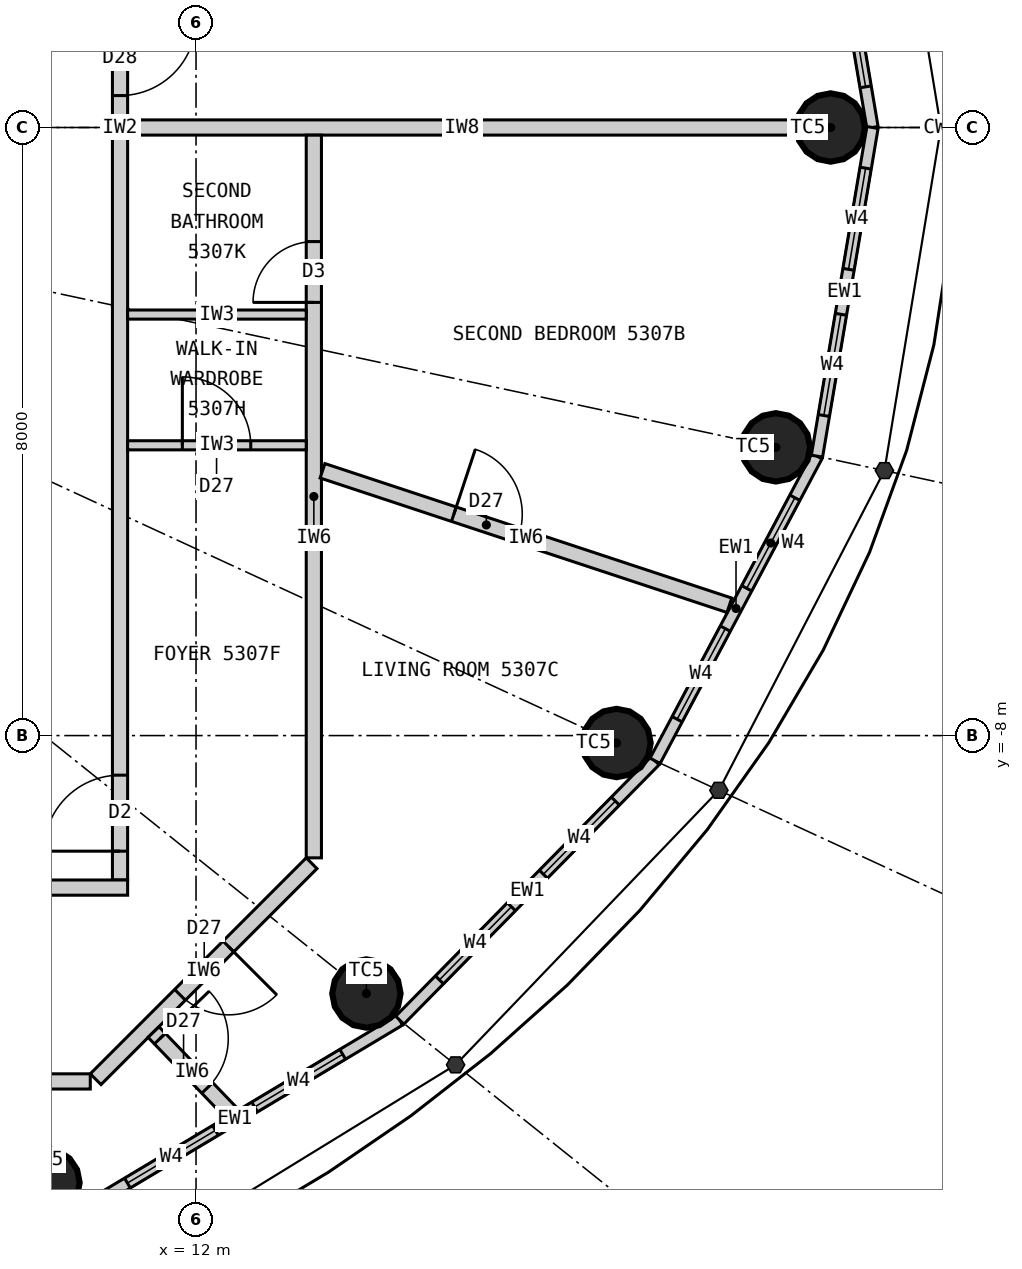
"""IFC4 building model, lengths in metres.
Left out: names, types, materials, properties, quantities, classifications, styles, units other than length and angle.
Written with IfcOpenShell. Run it as: python <this file> out.ifc"""

import sys

from ifc_helpers import new_model, si_unit, direction, frame, frame_2d, origin, origin_2d, place, context, subcontext, project, spatial, rectangle, circle, extrude, element, fill, save


model = new_model("IFC4")
c1 = context("Model", 3, precision=1e-05, world=origin(), true_north=direction((0.0, 1.0)))
c2 = subcontext(c1, "Body", "Model", "MODEL_VIEW")
j1 = project(units=[si_unit("LENGTHUNIT", "METRE"), si_unit("PLANEANGLEUNIT", "RADIAN")], contexts=[c1])
p1 = place(None, origin())
s1 = spatial("IfcSite", under=j1, at=p1, CompositionType="ELEMENT")
p2 = place(p1, origin())
s2 = spatial("IfcBuilding", under=s1, at=p2, CompositionType="ELEMENT")
p3 = place(p2, frame((0.0, 0.0, 199.5)))
s3 = spatial("IfcBuildingStorey", under=s2, at=p3, CompositionType="ELEMENT", Elevation=199.5)
for number, where, z_axis, x_axis in (
    (1, (20.35, 0.0, 0.0), (0.0, 0.0, 1.0), (1.0, 0.0, 0.0)),
    (2, (10.019, -13.883, 0.0), (0.0, 0.0, 1.0), (1.0, 0.0, 0.0)),
    (3, (14.241, -11.393, 0.0), (0.0, 0.0, 1.0), (1.0, 0.0, 0.0)),
    (4, (17.532, -8.098, 0.0), (0.0, 0.0, 1.0), (1.0, 0.0, 0.0)),
    (5, (19.629, -4.208, 0.0), (0.0, 0.0, 1.0), (1.0, 0.0, 0.0)),
):
    element("IfcColumn", number, at=place(p3, frame(where, z_axis=z_axis, x_axis=x_axis)), inside=s3, PredefinedType="COLUMN", context=c2, shape_type="SweptSolid", body=[
        extrude(circle(Radius=0.45, at=origin_2d()), origin(), (0.0, 0.0, 1.0), 3.3),
    ])
p4 = place(p3, frame((20.9, 0.0, 0.0), z_axis=(0.0, 0.0, 1.0), x_axis=(-0.166538513568, 0.986034950445, 0.0)))
e6 = element("IfcWall", 6, at=p4, inside=s3, PredefinedType="ELEMENTEDWALL", context=c2, shape_type="SweptSolid", body=[
    extrude(rectangle(XDim=4.385, YDim=0.15, at=frame_2d((2.192, 0.0))), origin(), (0.0, 0.0, 1.0), 3.12),
])
p5 = place(p4, frame((0.542, 0.0, 0.9)))
e7 = element("IfcOpeningElement", 7, at=p5, cuts=e6, PredefinedType="OPENING", context=c2, shape_type="SweptSolid", body=[
    extrude(rectangle(XDim=1.35, YDim=1.9, at=frame_2d((0.675, 0.95))), frame((0.0, 0.085, 0.0), z_axis=(0.0, -1.0, 0.0), x_axis=(1.0, 0.0, 0.0)), (0.0, 0.0, 1.0), 0.17),
])
p6 = place(p4, frame((2.492, 0.0, 0.9)))
e8 = element("IfcOpeningElement", 8, at=p6, cuts=e6, PredefinedType="OPENING", context=c2, shape_type="SweptSolid", body=[
    extrude(rectangle(XDim=1.35, YDim=1.9, at=frame_2d((0.675, 0.95))), frame((0.0, 0.085, 0.0), z_axis=(0.0, -1.0, 0.0), x_axis=(1.0, 0.0, 0.0)), (0.0, 0.0, 1.0), 0.17),
])
p7 = place(p3, frame((10.346, -14.336, 0.0), z_axis=(0.0, 0.0, 1.0), x_axis=(0.85822150553, 0.513279502265, 0.0)))
e9 = element("IfcWall", 9, at=p7, inside=s3, PredefinedType="ELEMENTEDWALL", context=c2, shape_type="SweptSolid", body=[
    extrude(rectangle(XDim=5.05, YDim=0.15, at=frame_2d((2.525, 0.0))), origin(), (0.0, 0.0, 1.0), 3.12),
])
p8 = place(p7, frame((0.875, 0.0, 0.9)))
e10 = element("IfcOpeningElement", 10, at=p8, cuts=e9, PredefinedType="OPENING", context=c2, shape_type="SweptSolid", body=[
    extrude(rectangle(XDim=1.35, YDim=1.9, at=frame_2d((0.675, 0.95))), frame((0.0, 0.085, 0.0), z_axis=(0.0, -1.0, 0.0), x_axis=(1.0, 0.0, 0.0)), (0.0, 0.0, 1.0), 0.17),
])
p9 = place(p7, frame((2.825, 0.0, 0.9)))
e11 = element("IfcOpeningElement", 11, at=p9, cuts=e9, PredefinedType="OPENING", context=c2, shape_type="SweptSolid", body=[
    extrude(rectangle(XDim=1.35, YDim=1.9, at=frame_2d((0.675, 0.95))), frame((0.0, 0.085, 0.0), z_axis=(0.0, -1.0, 0.0), x_axis=(1.0, 0.0, 0.0)), (0.0, 0.0, 1.0), 0.17),
])
p10 = place(p3, frame((14.68, -11.744, 0.0), z_axis=(0.0, 0.0, 1.0), x_axis=(0.701527379618, 0.712642501993, 0.0)))
e12 = element("IfcWall", 12, at=p10, inside=s3, PredefinedType="ELEMENTEDWALL", context=c2, shape_type="SweptSolid", body=[
    extrude(rectangle(XDim=4.788, YDim=0.15, at=frame_2d((2.394, 0.0))), origin(), (0.0, 0.0, 1.0), 3.12),
])
p11 = place(p10, frame((0.744, 0.0, 0.9)))
e13 = element("IfcOpeningElement", 13, at=p11, cuts=e12, PredefinedType="OPENING", context=c2, shape_type="SweptSolid", body=[
    extrude(rectangle(XDim=1.35, YDim=1.9, at=frame_2d((0.675, 0.95))), frame((0.0, 0.085, 0.0), z_axis=(0.0, -1.0, 0.0), x_axis=(1.0, 0.0, 0.0)), (0.0, 0.0, 1.0), 0.17),
])
p12 = place(p10, frame((2.694, 0.0, 0.9)))
e14 = element("IfcOpeningElement", 14, at=p12, cuts=e12, PredefinedType="OPENING", context=c2, shape_type="SweptSolid", body=[
    extrude(rectangle(XDim=1.35, YDim=1.9, at=frame_2d((0.675, 0.95))), frame((0.0, 0.085, 0.0), z_axis=(0.0, -1.0, 0.0), x_axis=(1.0, 0.0, 0.0)), (0.0, 0.0, 1.0), 0.17),
])
p13 = place(p3, frame((18.04, -8.332, 0.0), z_axis=(0.0, 0.0, 1.0), x_axis=(0.469256152955, 0.883062094597, 0.0)))
e15 = element("IfcWall", 15, at=p13, inside=s3, PredefinedType="ELEMENTEDWALL", context=c2, shape_type="SweptSolid", body=[
    extrude(rectangle(XDim=4.539, YDim=0.15, at=frame_2d((2.27, 0.0))), origin(), (0.0, 0.0, 1.0), 3.12),
])
p14 = place(p13, frame((0.62, 0.0, 0.9)))
e16 = element("IfcOpeningElement", 16, at=p14, cuts=e15, PredefinedType="OPENING", context=c2, shape_type="SweptSolid", body=[
    extrude(rectangle(XDim=1.35, YDim=1.9, at=frame_2d((0.675, 0.95))), frame((0.0, 0.085, 0.0), z_axis=(0.0, -1.0, 0.0), x_axis=(1.0, 0.0, 0.0)), (0.0, 0.0, 1.0), 0.17),
])
p15 = place(p13, frame((2.57, 0.0, 0.9)))
e17 = element("IfcOpeningElement", 17, at=p15, cuts=e15, PredefinedType="OPENING", context=c2, shape_type="SweptSolid", body=[
    extrude(rectangle(XDim=1.35, YDim=1.9, at=frame_2d((0.675, 0.95))), frame((0.0, 0.085, 0.0), z_axis=(0.0, -1.0, 0.0), x_axis=(1.0, 0.0, 0.0)), (0.0, 0.0, 1.0), 0.17),
])
p16 = place(p3, frame((20.17, -4.323, 0.0), z_axis=(0.0, 0.0, 1.0), x_axis=(0.166538513568, 0.986034950445, 0.0)))
e18 = element("IfcWall", 18, at=p16, inside=s3, PredefinedType="ELEMENTEDWALL", context=c2, shape_type="SweptSolid", body=[
    extrude(rectangle(XDim=4.385, YDim=0.15, at=frame_2d((2.192, 0.0))), origin(), (0.0, 0.0, 1.0), 3.12),
])
p17 = place(p16, frame((0.542, 0.0, 0.9)))
e19 = element("IfcOpeningElement", 19, at=p17, cuts=e18, PredefinedType="OPENING", context=c2, shape_type="SweptSolid", body=[
    extrude(rectangle(XDim=1.35, YDim=1.9, at=frame_2d((0.675, 0.95))), frame((0.0, 0.085, 0.0), z_axis=(0.0, -1.0, 0.0), x_axis=(1.0, 0.0, 0.0)), (0.0, 0.0, 1.0), 0.17),
])
p18 = place(p16, frame((2.492, 0.0, 0.9)))
e20 = element("IfcOpeningElement", 20, at=p18, cuts=e18, PredefinedType="OPENING", context=c2, shape_type="SweptSolid", body=[
    extrude(rectangle(XDim=1.35, YDim=1.9, at=frame_2d((0.675, 0.95))), frame((0.0, 0.085, 0.0), z_axis=(0.0, -1.0, 0.0), x_axis=(1.0, 0.0, 0.0)), (0.0, 0.0, 1.0), 0.17),
])
p19 = place(p3, frame((11.0, -9.9, 0.0), z_axis=(0.0, 0.0, 1.0), x_axis=(0.0, 1.0, 0.0)))
e21 = element("IfcWall", 21, at=p19, inside=s3, PredefinedType="PARTITIONING", context=c2, shape_type="SweptSolid", body=[
    extrude(rectangle(XDim=19.8, YDim=0.2, at=frame_2d((9.9, 0.0))), origin(), (0.0, 0.0, 1.0), 3.12),
])
p20 = place(p19, frame((10.32, 0.0, 0.0)))
e22 = element("IfcOpeningElement", 22, at=p20, cuts=e21, PredefinedType="OPENING", context=c2, shape_type="SweptSolid", body=[
    extrude(rectangle(XDim=1.0, YDim=2.2, at=frame_2d((0.5, 1.1))), frame((0.0, 0.11, 0.0), z_axis=(0.0, -1.0, 0.0), x_axis=(1.0, 0.0, 0.0)), (0.0, 0.0, 1.0), 0.22),
])
p21 = place(p19, frame((18.653, 0.0, 0.0)))
e23 = element("IfcOpeningElement", 23, at=p21, cuts=e21, PredefinedType="OPENING", context=c2, shape_type="SweptSolid", body=[
    extrude(rectangle(XDim=1.0, YDim=2.2, at=frame_2d((0.5, 1.1))), frame((0.0, 0.11, 0.0), z_axis=(0.0, -1.0, 0.0), x_axis=(1.0, 0.0, 0.0)), (0.0, 0.0, 1.0), 0.22),
])
p22 = place(p19, frame((0.379, 0.0, 0.0)))
e24 = element("IfcOpeningElement", 24, at=p22, cuts=e21, PredefinedType="OPENING", context=c2, shape_type="SweptSolid", body=[
    extrude(rectangle(XDim=1.0, YDim=2.2, at=frame_2d((0.5, 1.1))), frame((0.0, 0.11, 0.0), z_axis=(0.0, -1.0, 0.0), x_axis=(1.0, 0.0, 0.0)), (0.0, 0.0, 1.0), 0.22),
])
p23 = place(p3, frame((11.1, -10.0, 0.0), z_axis=(0.0, 0.0, 1.0), x_axis=(-1.0, 0.0, 0.0)))
e25 = element("IfcWall", 25, at=p23, inside=s3, PredefinedType="PARTITIONING", context=c2, shape_type="SweptSolid", body=[
    extrude(rectangle(XDim=12.559, YDim=0.2, at=frame_2d((6.28, 0.0))), origin(), (0.0, 0.0, 1.0), 3.12),
])
p24 = place(p3, frame((11.1, 0.0, 0.0), z_axis=(0.0, 0.0, 1.0), x_axis=(1.0, 0.0, 0.0)))
e26 = element("IfcWall", 26, at=p24, inside=s3, PredefinedType="PARTITIONING", context=c2, shape_type="SweptSolid", body=[
    extrude(rectangle(XDim=8.8, YDim=0.2, at=frame_2d((4.4, 0.0))), origin(), (0.0, 0.0, 1.0), 2.37),
])
p25 = place(p3, frame((4.325, -12.55, 0.0), z_axis=(0.0, 0.0, 1.0), x_axis=(1.0, 0.0, 0.0)))
e27 = element("IfcWall", 27, at=p25, inside=s3, PredefinedType="PARTITIONING", context=c2, shape_type="SweptSolid", body=[
    extrude(rectangle(XDim=6.284, YDim=0.2, at=frame_2d((3.142, 0.0))), origin(), (0.0, 0.0, 1.0), 3.12),
])
p26 = place(p25, frame((0.564, 0.0, 0.0)))
e28 = element("IfcOpeningElement", 28, at=p26, cuts=e27, PredefinedType="OPENING", context=c2, shape_type="SweptSolid", body=[
    extrude(rectangle(XDim=0.8, YDim=2.1, at=frame_2d((0.4, 1.05))), frame((0.0, 0.11, 0.0), z_axis=(0.0, -1.0, 0.0), x_axis=(1.0, 0.0, 0.0)), (0.0, 0.0, 1.0), 0.22),
])
p27 = place(p3, frame((10.679, -12.521, 0.0), z_axis=(0.0, 0.0, 1.0), x_axis=(0.707106781187, 0.707106781187, 0.0)))
e29 = element("IfcWall", 29, at=p27, inside=s3, PredefinedType="PARTITIONING", context=c2, shape_type="SweptSolid", body=[
    extrude(rectangle(XDim=4.019, YDim=0.2, at=frame_2d((2.009, 0.0))), origin(), (0.0, 0.0, 1.0), 3.12),
])
p28 = place(p27, frame((1.57, 0.0, 0.0)))
e30 = element("IfcOpeningElement", 30, at=p28, cuts=e29, PredefinedType="OPENING", context=c2, shape_type="SweptSolid", body=[
    extrude(rectangle(XDim=0.9, YDim=2.1, at=frame_2d((0.45, 1.05))), frame((0.0, 0.11, 0.0), z_axis=(0.0, -1.0, 0.0), x_axis=(1.0, 0.0, 0.0)), (0.0, 0.0, 1.0), 0.22),
])
p29 = place(p3, frame((13.55, -9.609, 0.0), z_axis=(0.0, 0.0, 1.0), x_axis=(0.0, 1.0, 0.0)))
e31 = element("IfcWall", 31, at=p29, inside=s3, PredefinedType="PARTITIONING", context=c2, shape_type="SweptSolid", body=[
    extrude(rectangle(XDim=9.508, YDim=0.2, at=frame_2d((4.754, 0.0))), origin(), (0.0, 0.0, 1.0), 3.12),
])
p30 = place(p29, frame((7.308, 0.0, 0.0)))
e32 = element("IfcOpeningElement", 32, at=p30, cuts=e31, PredefinedType="OPENING", context=c2, shape_type="SweptSolid", body=[
    extrude(rectangle(XDim=0.8, YDim=2.1, at=frame_2d((0.4, 1.05))), frame((0.0, 0.11, 0.0), z_axis=(0.0, -1.0, 0.0), x_axis=(1.0, 0.0, 0.0)), (0.0, 0.0, 1.0), 0.22),
])
p31 = place(p3, frame((11.441, -11.9, 0.0), z_axis=(0.0, 0.0, 1.0), x_axis=(0.692958717259, -0.720977264672, 0.0)))
e33 = element("IfcWall", 33, at=p31, inside=s3, PredefinedType="PARTITIONING", context=c2, shape_type="SweptSolid", body=[
    extrude(rectangle(XDim=1.464, YDim=0.2, at=frame_2d((0.732, 0.0))), origin(), (0.0, 0.0, 1.0), 3.12),
])
p32 = place(p31, frame((0.12, 0.0, 0.0)))
e34 = element("IfcOpeningElement", 34, at=p32, cuts=e33, PredefinedType="OPENING", context=c2, shape_type="SweptSolid", body=[
    extrude(rectangle(XDim=0.9, YDim=2.1, at=frame_2d((0.45, 1.05))), frame((0.0, 0.11, 0.0), z_axis=(0.0, -1.0, 0.0), x_axis=(1.0, 0.0, 0.0)), (0.0, 0.0, 1.0), 0.22),
])
p33 = place(p3, frame((13.664, -4.516, 0.0), z_axis=(0.0, 0.0, 1.0), x_axis=(0.949481375941, -0.313823384632, 0.0)))
e35 = element("IfcWall", 35, at=p33, inside=s3, PredefinedType="PARTITIONING", context=c2, shape_type="SweptSolid", body=[
    extrude(rectangle(XDim=5.638, YDim=0.2, at=frame_2d((2.819, 0.0))), origin(), (0.0, 0.0, 1.0), 3.12),
])
p34 = place(p33, frame((1.82, 0.0, 0.0)))
e36 = element("IfcOpeningElement", 36, at=p34, cuts=e35, PredefinedType="OPENING", context=c2, shape_type="SweptSolid", body=[
    extrude(rectangle(XDim=0.9, YDim=2.1, at=frame_2d((0.45, 1.05))), frame((0.0, 0.11, 0.0), z_axis=(0.0, -1.0, 0.0), x_axis=(1.0, 0.0, 0.0)), (0.0, 0.0, 1.0), 0.22),
])
p35 = place(p3, frame((11.1, -4.181, 0.0), z_axis=(0.0, 0.0, 1.0), x_axis=(1.0, 0.0, 0.0)))
e37 = element("IfcWall", 37, at=p35, inside=s3, PredefinedType="PARTITIONING", context=c2, shape_type="SweptSolid", body=[
    extrude(rectangle(XDim=2.35, YDim=0.12, at=frame_2d((1.175, 0.0))), origin(), (0.0, 0.0, 1.0), 3.12),
])
p36 = place(p35, frame((0.72, 0.0, 0.0)))
e38 = element("IfcOpeningElement", 38, at=p36, cuts=e37, PredefinedType="OPENING", context=c2, shape_type="SweptSolid", body=[
    extrude(rectangle(XDim=0.9, YDim=2.1, at=frame_2d((0.45, 1.05))), frame((0.0, 0.07, 0.0), z_axis=(0.0, -1.0, 0.0), x_axis=(1.0, 0.0, 0.0)), (0.0, 0.0, 1.0), 0.14),
])
p37 = place(p3, frame((11.1, -2.461, 0.0), z_axis=(0.0, 0.0, 1.0), x_axis=(1.0, 0.0, 0.0)))
e39 = element("IfcWall", 39, at=p37, inside=s3, PredefinedType="PARTITIONING", context=c2, shape_type="SweptSolid", body=[
    extrude(rectangle(XDim=2.35, YDim=0.12, at=frame_2d((1.175, 0.0))), origin(), (0.0, 0.0, 1.0), 3.12),
])
p38 = place(p5, origin())
e40 = element("IfcWindow", 40, at=p38, inside=s3, PartitioningType="SINGLE_PANEL", PredefinedType="WINDOW", context=c2, shape_type="SweptSolid", body=[
    extrude(rectangle(XDim=1.35, YDim=1.9, at=frame_2d((0.675, 0.95))), frame((0.0, 0.03, 0.0), z_axis=(0.0, -1.0, 0.0), x_axis=(1.0, 0.0, 0.0)), (0.0, 0.0, 1.0), 0.06),
])
fill(e7, e40)
p39 = place(p8, origin())
e41 = element("IfcWindow", 41, at=p39, inside=s3, PartitioningType="SINGLE_PANEL", PredefinedType="WINDOW", context=c2, shape_type="SweptSolid", body=[
    extrude(rectangle(XDim=1.35, YDim=1.9, at=frame_2d((0.675, 0.95))), frame((0.0, 0.03, 0.0), z_axis=(0.0, -1.0, 0.0), x_axis=(1.0, 0.0, 0.0)), (0.0, 0.0, 1.0), 0.06),
])
fill(e10, e41)
p40 = place(p9, origin())
e42 = element("IfcWindow", 42, at=p40, inside=s3, PartitioningType="SINGLE_PANEL", PredefinedType="WINDOW", context=c2, shape_type="SweptSolid", body=[
    extrude(rectangle(XDim=1.35, YDim=1.9, at=frame_2d((0.675, 0.95))), frame((0.0, 0.03, 0.0), z_axis=(0.0, -1.0, 0.0), x_axis=(1.0, 0.0, 0.0)), (0.0, 0.0, 1.0), 0.06),
])
fill(e11, e42)
p41 = place(p11, origin())
e43 = element("IfcWindow", 43, at=p41, inside=s3, PartitioningType="SINGLE_PANEL", PredefinedType="WINDOW", context=c2, shape_type="SweptSolid", body=[
    extrude(rectangle(XDim=1.35, YDim=1.9, at=frame_2d((0.675, 0.95))), frame((0.0, 0.03, 0.0), z_axis=(0.0, -1.0, 0.0), x_axis=(1.0, 0.0, 0.0)), (0.0, 0.0, 1.0), 0.06),
])
fill(e13, e43)
p42 = place(p12, origin())
e44 = element("IfcWindow", 44, at=p42, inside=s3, PartitioningType="SINGLE_PANEL", PredefinedType="WINDOW", context=c2, shape_type="SweptSolid", body=[
    extrude(rectangle(XDim=1.35, YDim=1.9, at=frame_2d((0.675, 0.95))), frame((0.0, 0.03, 0.0), z_axis=(0.0, -1.0, 0.0), x_axis=(1.0, 0.0, 0.0)), (0.0, 0.0, 1.0), 0.06),
])
fill(e14, e44)
p43 = place(p14, origin())
e45 = element("IfcWindow", 45, at=p43, inside=s3, PartitioningType="SINGLE_PANEL", PredefinedType="WINDOW", context=c2, shape_type="SweptSolid", body=[
    extrude(rectangle(XDim=1.35, YDim=1.9, at=frame_2d((0.675, 0.95))), frame((0.0, 0.03, 0.0), z_axis=(0.0, -1.0, 0.0), x_axis=(1.0, 0.0, 0.0)), (0.0, 0.0, 1.0), 0.06),
])
fill(e16, e45)
p44 = place(p15, origin())
e46 = element("IfcWindow", 46, at=p44, inside=s3, PartitioningType="SINGLE_PANEL", PredefinedType="WINDOW", context=c2, shape_type="SweptSolid", body=[
    extrude(rectangle(XDim=1.35, YDim=1.9, at=frame_2d((0.675, 0.95))), frame((0.0, 0.03, 0.0), z_axis=(0.0, -1.0, 0.0), x_axis=(1.0, 0.0, 0.0)), (0.0, 0.0, 1.0), 0.06),
])
fill(e17, e46)
p45 = place(p17, origin())
e47 = element("IfcWindow", 47, at=p45, inside=s3, PartitioningType="SINGLE_PANEL", PredefinedType="WINDOW", context=c2, shape_type="SweptSolid", body=[
    extrude(rectangle(XDim=1.35, YDim=1.9, at=frame_2d((0.675, 0.95))), frame((0.0, 0.03, 0.0), z_axis=(0.0, -1.0, 0.0), x_axis=(1.0, 0.0, 0.0)), (0.0, 0.0, 1.0), 0.06),
])
fill(e19, e47)
p46 = place(p18, origin())
e48 = element("IfcWindow", 48, at=p46, inside=s3, PartitioningType="SINGLE_PANEL", PredefinedType="WINDOW", context=c2, shape_type="SweptSolid", body=[
    extrude(rectangle(XDim=1.35, YDim=1.9, at=frame_2d((0.675, 0.95))), frame((0.0, 0.03, 0.0), z_axis=(0.0, -1.0, 0.0), x_axis=(1.0, 0.0, 0.0)), (0.0, 0.0, 1.0), 0.06),
])
fill(e20, e48)
p47 = place(p20, origin())
e49 = element("IfcDoor", 49, at=p47, inside=s3, OperationType="SINGLE_SWING_RIGHT", PredefinedType="DOOR", context=c2, shape_type="SweptSolid", body=[
    extrude(rectangle(XDim=1.0, YDim=2.2, at=frame_2d((0.5, 1.1))), frame((0.0, 0.025, 0.0), z_axis=(0.0, -1.0, 0.0), x_axis=(1.0, 0.0, 0.0)), (0.0, 0.0, 1.0), 0.05),
])
fill(e22, e49)
p48 = place(p22, origin())
e50 = element("IfcDoor", 50, at=p48, inside=s3, OperationType="SINGLE_SWING_LEFT", PredefinedType="DOOR", context=c2, shape_type="SweptSolid", body=[
    extrude(rectangle(XDim=1.0, YDim=2.2, at=frame_2d((0.5, 1.1))), frame((0.0, 0.025, 0.0), z_axis=(0.0, -1.0, 0.0), x_axis=(1.0, 0.0, 0.0)), (0.0, 0.0, 1.0), 0.05),
])
fill(e24, e50)
p49 = place(p36, origin())
e51 = element("IfcDoor", 51, at=p49, inside=s3, OperationType="SINGLE_SWING_LEFT", PredefinedType="DOOR", context=c2, shape_type="SweptSolid", body=[
    extrude(rectangle(XDim=0.9, YDim=2.1, at=frame_2d((0.45, 1.05))), frame((0.0, 0.025, 0.0), z_axis=(0.0, -1.0, 0.0), x_axis=(1.0, 0.0, 0.0)), (0.0, 0.0, 1.0), 0.05),
])
fill(e38, e51)
p50 = place(p30, origin())
e52 = element("IfcDoor", 52, at=p50, inside=s3, OperationType="SINGLE_SWING_LEFT", PredefinedType="DOOR", context=c2, shape_type="SweptSolid", body=[
    extrude(rectangle(XDim=0.8, YDim=2.1, at=frame_2d((0.4, 1.05))), frame((0.0, 0.025, 0.0), z_axis=(0.0, -1.0, 0.0), x_axis=(1.0, 0.0, 0.0)), (0.0, 0.0, 1.0), 0.05),
])
fill(e32, e52)
p51 = place(p28, origin())
e53 = element("IfcDoor", 53, at=p51, inside=s3, OperationType="SINGLE_SWING_RIGHT", PredefinedType="DOOR", context=c2, shape_type="SweptSolid", body=[
    extrude(rectangle(XDim=0.9, YDim=2.1, at=frame_2d((0.45, 1.05))), frame((0.0, 0.025, 0.0), z_axis=(0.0, -1.0, 0.0), x_axis=(1.0, 0.0, 0.0)), (0.0, 0.0, 1.0), 0.05),
])
fill(e30, e53)
p52 = place(p32, origin())
e54 = element("IfcDoor", 54, at=p52, inside=s3, OperationType="SINGLE_SWING_LEFT", PredefinedType="DOOR", context=c2, shape_type="SweptSolid", body=[
    extrude(rectangle(XDim=0.9, YDim=2.1, at=frame_2d((0.45, 1.05))), frame((0.0, 0.025, 0.0), z_axis=(0.0, -1.0, 0.0), x_axis=(1.0, 0.0, 0.0)), (0.0, 0.0, 1.0), 0.05),
])
fill(e34, e54)
p53 = place(p34, origin())
e55 = element("IfcDoor", 55, at=p53, inside=s3, OperationType="SINGLE_SWING_LEFT", PredefinedType="DOOR", context=c2, shape_type="SweptSolid", body=[
    extrude(rectangle(XDim=0.9, YDim=2.1, at=frame_2d((0.45, 1.05))), frame((0.0, 0.025, 0.0), z_axis=(0.0, -1.0, 0.0), x_axis=(1.0, 0.0, 0.0)), (0.0, 0.0, 1.0), 0.05),
])
fill(e36, e55)
save(model, sys.argv[1])
